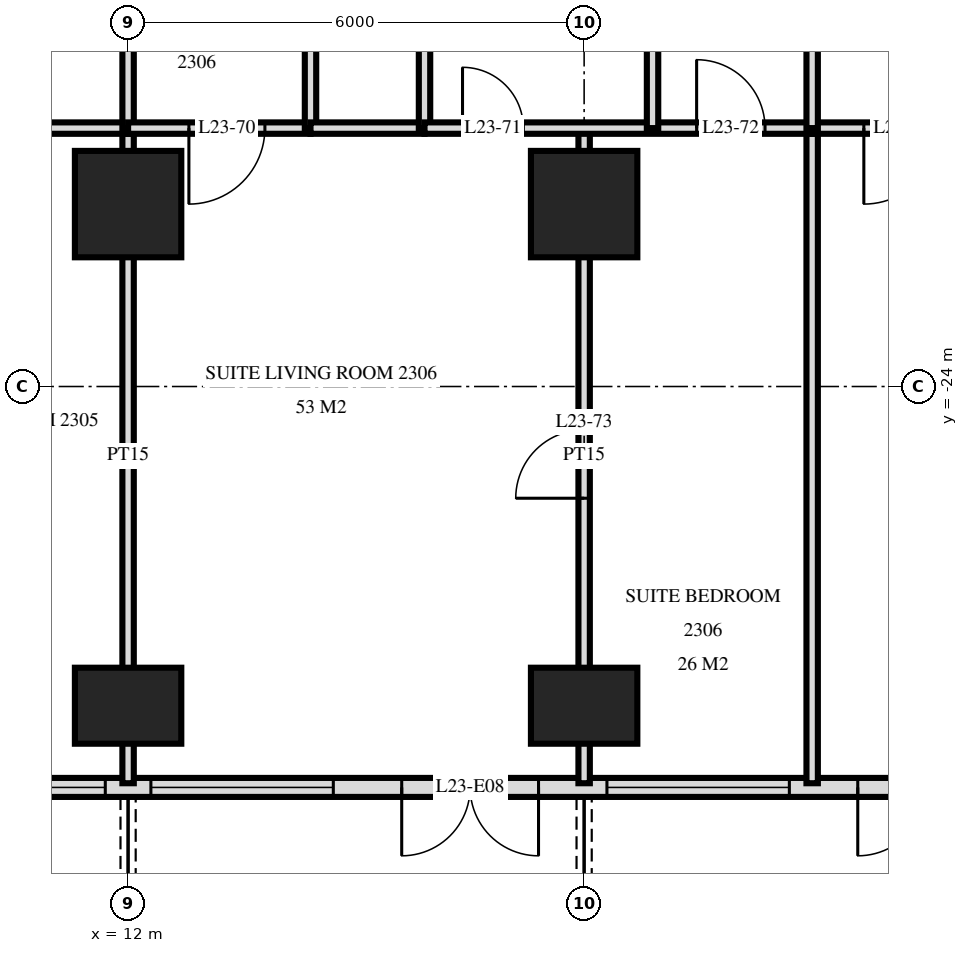
"""IFC4 building model, lengths in metres.
Left out: names, types, materials, properties, quantities, classifications, styles, units other than length and angle.
Written with IfcOpenShell. Run it as: python <this file> out.ifc"""

import sys

from ifc_helpers import new_model, si_unit, direction, frame, frame_2d, origin, origin_2d, place, context, subcontext, project, spatial, rectangle, extrude, element, fill, save


model = new_model("IFC4")
c1 = context("Model", 3, precision=1e-05, world=origin(), true_north=direction((0.0, 1.0)))
c2 = subcontext(c1, "Body", "Model", "MODEL_VIEW")
j1 = project(units=[si_unit("LENGTHUNIT", "METRE"), si_unit("PLANEANGLEUNIT", "RADIAN")], contexts=[c1])
p1 = place(None, origin())
s1 = spatial("IfcSite", under=j1, at=p1, CompositionType="ELEMENT")
p2 = place(p1, origin())
s2 = spatial("IfcBuilding", under=s1, at=p2, CompositionType="ELEMENT")
p3 = place(p2, frame((0.0, 0.0, 92.4)))
s3 = spatial("IfcBuildingStorey", under=s2, at=p3, CompositionType="ELEMENT", Elevation=92.4)
p4 = place(p3, frame((12.0, -28.2, 0.0), z_axis=(0.0, 0.0, 1.0), x_axis=(1.0, 0.0, 0.0)))
e1 = element("IfcColumn", 1, at=p4, inside=s3, PredefinedType="COLUMN", context=c2, shape_type="SweptSolid", body=[
    extrude(rectangle(XDim=1.4, YDim=1.0, at=origin_2d()), origin(), (0.0, 0.0, 1.0), 3.6),
])
p5 = place(p3, frame((12.0, -21.6, 0.0), z_axis=(0.0, 0.0, 1.0), x_axis=(1.0, 0.0, 0.0)))
e2 = element("IfcColumn", 2, at=p5, inside=s3, PredefinedType="COLUMN", context=c2, shape_type="SweptSolid", body=[
    extrude(rectangle(XDim=1.4, YDim=1.4, at=origin_2d()), origin(), (0.0, 0.0, 1.0), 3.6),
])
p6 = place(p3, frame((18.0, -28.2, 0.0), z_axis=(0.0, 0.0, 1.0), x_axis=(1.0, 0.0, 0.0)))
e3 = element("IfcColumn", 3, at=p6, inside=s3, PredefinedType="COLUMN", context=c2, shape_type="SweptSolid", body=[
    extrude(rectangle(XDim=1.4, YDim=1.0, at=origin_2d()), origin(), (0.0, 0.0, 1.0), 3.6),
])
p7 = place(p3, frame((18.0, -21.6, 0.0), z_axis=(0.0, 0.0, 1.0), x_axis=(1.0, 0.0, 0.0)))
e4 = element("IfcColumn", 4, at=p7, inside=s3, PredefinedType="COLUMN", context=c2, shape_type="SweptSolid", body=[
    extrude(rectangle(XDim=1.4, YDim=1.4, at=origin_2d()), origin(), (0.0, 0.0, 1.0), 3.6),
])
p8 = place(p3, frame((-28.775, -29.275, 0.0), z_axis=(0.0, 0.0, 1.0), x_axis=(1.0, 0.0, 0.0)))
e5 = element("IfcWall", 5, at=p8, inside=s3, PredefinedType="SOLIDWALL", context=c2, shape_type="SweptSolid", body=[
    extrude(rectangle(XDim=57.551, YDim=0.25, at=frame_2d((28.775, 0.0))), origin(), (0.0, 0.0, 1.0), 3.32),
])
p9 = place(p8, frame((0.575, 0.0, 0.0)))
e6 = element("IfcOpeningElement", 6, at=p9, cuts=e5, PredefinedType="OPENING", context=c2, shape_type="SweptSolid", body=[
    extrude(rectangle(XDim=1.8, YDim=2.4, at=frame_2d((0.9, 1.2))), frame((0.0, 0.135, 0.0), z_axis=(0.0, -1.0, 0.0), x_axis=(1.0, 0.0, 0.0)), (0.0, 0.0, 1.0), 0.27),
])
p10 = place(p8, frame((5.075, 0.0, 0.3)))
e7 = element("IfcOpeningElement", 7, at=p10, cuts=e5, PredefinedType="OPENING", context=c2, shape_type="SweptSolid", body=[
    extrude(rectangle(XDim=2.4, YDim=2.1, at=frame_2d((1.2, 1.05))), frame((0.0, 0.135, 0.0), z_axis=(0.0, -1.0, 0.0), x_axis=(1.0, 0.0, 0.0)), (0.0, 0.0, 1.0), 0.27),
])
p11 = place(p8, frame((8.375, 0.0, 0.0)))
e8 = element("IfcOpeningElement", 8, at=p11, cuts=e5, PredefinedType="OPENING", context=c2, shape_type="SweptSolid", body=[
    extrude(rectangle(XDim=1.8, YDim=2.4, at=frame_2d((0.9, 1.2))), frame((0.0, 0.135, 0.0), z_axis=(0.0, -1.0, 0.0), x_axis=(1.0, 0.0, 0.0)), (0.0, 0.0, 1.0), 0.27),
])
p12 = place(p8, frame((11.375, 0.0, 0.0)))
e9 = element("IfcOpeningElement", 9, at=p12, cuts=e5, PredefinedType="OPENING", context=c2, shape_type="SweptSolid", body=[
    extrude(rectangle(XDim=1.8, YDim=2.4, at=frame_2d((0.9, 1.2))), frame((0.0, 0.135, 0.0), z_axis=(0.0, -1.0, 0.0), x_axis=(1.0, 0.0, 0.0)), (0.0, 0.0, 1.0), 0.27),
])
p13 = place(p8, frame((14.075, 0.0, 0.3)))
e10 = element("IfcOpeningElement", 10, at=p13, cuts=e5, PredefinedType="OPENING", context=c2, shape_type="SweptSolid", body=[
    extrude(rectangle(XDim=2.4, YDim=2.1, at=frame_2d((1.2, 1.05))), frame((0.0, 0.135, 0.0), z_axis=(0.0, -1.0, 0.0), x_axis=(1.0, 0.0, 0.0)), (0.0, 0.0, 1.0), 0.27),
])
p14 = place(p8, frame((17.375, 0.0, 0.0)))
e11 = element("IfcOpeningElement", 11, at=p14, cuts=e5, PredefinedType="OPENING", context=c2, shape_type="SweptSolid", body=[
    extrude(rectangle(XDim=1.8, YDim=2.4, at=frame_2d((0.9, 1.2))), frame((0.0, 0.135, 0.0), z_axis=(0.0, -1.0, 0.0), x_axis=(1.0, 0.0, 0.0)), (0.0, 0.0, 1.0), 0.27),
])
p15 = place(p8, frame((20.075, 0.0, 0.3)))
e12 = element("IfcOpeningElement", 12, at=p15, cuts=e5, PredefinedType="OPENING", context=c2, shape_type="SweptSolid", body=[
    extrude(rectangle(XDim=2.4, YDim=2.1, at=frame_2d((1.2, 1.05))), frame((0.0, 0.135, 0.0), z_axis=(0.0, -1.0, 0.0), x_axis=(1.0, 0.0, 0.0)), (0.0, 0.0, 1.0), 0.27),
])
p16 = place(p8, frame((23.075, 0.0, 0.3)))
e13 = element("IfcOpeningElement", 13, at=p16, cuts=e5, PredefinedType="OPENING", context=c2, shape_type="SweptSolid", body=[
    extrude(rectangle(XDim=2.4, YDim=2.1, at=frame_2d((1.2, 1.05))), frame((0.0, 0.135, 0.0), z_axis=(0.0, -1.0, 0.0), x_axis=(1.0, 0.0, 0.0)), (0.0, 0.0, 1.0), 0.27),
])
p17 = place(p8, frame((26.375, 0.0, 0.0)))
e14 = element("IfcOpeningElement", 14, at=p17, cuts=e5, PredefinedType="OPENING", context=c2, shape_type="SweptSolid", body=[
    extrude(rectangle(XDim=1.8, YDim=2.4, at=frame_2d((0.9, 1.2))), frame((0.0, 0.135, 0.0), z_axis=(0.0, -1.0, 0.0), x_axis=(1.0, 0.0, 0.0)), (0.0, 0.0, 1.0), 0.27),
])
p18 = place(p8, frame((29.375, 0.0, 0.0)))
e15 = element("IfcOpeningElement", 15, at=p18, cuts=e5, PredefinedType="OPENING", context=c2, shape_type="SweptSolid", body=[
    extrude(rectangle(XDim=1.8, YDim=2.4, at=frame_2d((0.9, 1.2))), frame((0.0, 0.135, 0.0), z_axis=(0.0, -1.0, 0.0), x_axis=(1.0, 0.0, 0.0)), (0.0, 0.0, 1.0), 0.27),
])
p19 = place(p8, frame((32.075, 0.0, 0.3)))
e16 = element("IfcOpeningElement", 16, at=p19, cuts=e5, PredefinedType="OPENING", context=c2, shape_type="SweptSolid", body=[
    extrude(rectangle(XDim=2.4, YDim=2.1, at=frame_2d((1.2, 1.05))), frame((0.0, 0.135, 0.0), z_axis=(0.0, -1.0, 0.0), x_axis=(1.0, 0.0, 0.0)), (0.0, 0.0, 1.0), 0.27),
])
p20 = place(p8, frame((35.375, 0.0, 0.0)))
e17 = element("IfcOpeningElement", 17, at=p20, cuts=e5, PredefinedType="OPENING", context=c2, shape_type="SweptSolid", body=[
    extrude(rectangle(XDim=1.8, YDim=2.4, at=frame_2d((0.9, 1.2))), frame((0.0, 0.135, 0.0), z_axis=(0.0, -1.0, 0.0), x_axis=(1.0, 0.0, 0.0)), (0.0, 0.0, 1.0), 0.27),
])
p21 = place(p8, frame((38.075, 0.0, 0.3)))
e18 = element("IfcOpeningElement", 18, at=p21, cuts=e5, PredefinedType="OPENING", context=c2, shape_type="SweptSolid", body=[
    extrude(rectangle(XDim=2.4, YDim=2.1, at=frame_2d((1.2, 1.05))), frame((0.0, 0.135, 0.0), z_axis=(0.0, -1.0, 0.0), x_axis=(1.0, 0.0, 0.0)), (0.0, 0.0, 1.0), 0.27),
])
p22 = place(p8, frame((41.075, 0.0, 0.3)))
e19 = element("IfcOpeningElement", 19, at=p22, cuts=e5, PredefinedType="OPENING", context=c2, shape_type="SweptSolid", body=[
    extrude(rectangle(XDim=2.4, YDim=2.1, at=frame_2d((1.2, 1.05))), frame((0.0, 0.135, 0.0), z_axis=(0.0, -1.0, 0.0), x_axis=(1.0, 0.0, 0.0)), (0.0, 0.0, 1.0), 0.27),
])
p23 = place(p8, frame((44.375, 0.0, 0.0)))
e20 = element("IfcOpeningElement", 20, at=p23, cuts=e5, PredefinedType="OPENING", context=c2, shape_type="SweptSolid", body=[
    extrude(rectangle(XDim=1.8, YDim=2.4, at=frame_2d((0.9, 1.2))), frame((0.0, 0.135, 0.0), z_axis=(0.0, -1.0, 0.0), x_axis=(1.0, 0.0, 0.0)), (0.0, 0.0, 1.0), 0.27),
])
p24 = place(p8, frame((47.075, 0.0, 0.3)))
e21 = element("IfcOpeningElement", 21, at=p24, cuts=e5, PredefinedType="OPENING", context=c2, shape_type="SweptSolid", body=[
    extrude(rectangle(XDim=2.4, YDim=2.1, at=frame_2d((1.2, 1.05))), frame((0.0, 0.135, 0.0), z_axis=(0.0, -1.0, 0.0), x_axis=(1.0, 0.0, 0.0)), (0.0, 0.0, 1.0), 0.27),
])
p25 = place(p8, frame((50.375, 0.0, 0.0)))
e22 = element("IfcOpeningElement", 22, at=p25, cuts=e5, PredefinedType="OPENING", context=c2, shape_type="SweptSolid", body=[
    extrude(rectangle(XDim=1.8, YDim=2.4, at=frame_2d((0.9, 1.2))), frame((0.0, 0.135, 0.0), z_axis=(0.0, -1.0, 0.0), x_axis=(1.0, 0.0, 0.0)), (0.0, 0.0, 1.0), 0.27),
])
p26 = place(p8, frame((53.375, 0.0, 0.0)))
e23 = element("IfcOpeningElement", 23, at=p26, cuts=e5, PredefinedType="OPENING", context=c2, shape_type="SweptSolid", body=[
    extrude(rectangle(XDim=1.8, YDim=2.4, at=frame_2d((0.9, 1.2))), frame((0.0, 0.135, 0.0), z_axis=(0.0, -1.0, 0.0), x_axis=(1.0, 0.0, 0.0)), (0.0, 0.0, 1.0), 0.27),
])
p27 = place(p3, frame((21.0, -20.6, 0.0), z_axis=(0.0, 0.0, 1.0), x_axis=(0.0, 1.0, 0.0)))
e24 = element("IfcWall", 24, at=p27, inside=s3, PredefinedType="PARTITIONING", context=c2, shape_type="SweptSolid", body=[
    extrude(rectangle(XDim=3.6, YDim=0.15, at=frame_2d((1.8, 0.0))), origin(), (0.0, 0.0, 1.0), 3.32),
])
p28 = place(p3, frame((21.0, -29.22, 0.0), z_axis=(0.0, 0.0, 1.0), x_axis=(0.0, 1.0, 0.0)))
e25 = element("IfcWall", 25, at=p28, inside=s3, PredefinedType="PARTITIONING", context=c2, shape_type="SweptSolid", body=[
    extrude(rectangle(XDim=8.62, YDim=0.15, at=frame_2d((4.31, 0.0))), origin(), (0.0, 0.0, 1.0), 3.32),
])
p29 = place(p3, frame((18.9, -20.6, 0.0), z_axis=(0.0, 0.0, 1.0), x_axis=(0.0, 1.0, 0.0)))
e26 = element("IfcWall", 26, at=p29, inside=s3, PredefinedType="PARTITIONING", context=c2, shape_type="SweptSolid", body=[
    extrude(rectangle(XDim=3.6, YDim=0.15, at=frame_2d((1.8, 0.0))), origin(), (0.0, 0.0, 1.0), 3.32),
])
p30 = place(p3, frame((18.0, -29.22, 0.0), z_axis=(0.0, 0.0, 1.0), x_axis=(0.0, 1.0, 0.0)))
e27 = element("IfcWall", 27, at=p30, inside=s3, PredefinedType="PARTITIONING", context=c2, shape_type="SweptSolid", body=[
    extrude(rectangle(XDim=8.62, YDim=0.15, at=frame_2d((4.31, 0.0))), origin(), (0.0, 0.0, 1.0), 3.32),
])
p31 = place(p30, frame((3.75, 0.0, 0.0)))
e28 = element("IfcOpeningElement", 28, at=p31, cuts=e27, PredefinedType="OPENING", context=c2, shape_type="SweptSolid", body=[
    extrude(rectangle(XDim=0.9, YDim=2.1, at=frame_2d((0.45, 1.05))), frame((0.0, 0.085, 0.0), z_axis=(0.0, -1.0, 0.0), x_axis=(1.0, 0.0, 0.0)), (0.0, 0.0, 1.0), 0.17),
])
p32 = place(p3, frame((15.9, -20.6, 0.0), z_axis=(0.0, 0.0, 1.0), x_axis=(0.0, 1.0, 0.0)))
e29 = element("IfcWall", 29, at=p32, inside=s3, PredefinedType="PLUMBINGWALL", context=c2, shape_type="SweptSolid", body=[
    extrude(rectangle(XDim=3.6, YDim=0.15, at=frame_2d((1.8, 0.0))), origin(), (0.0, 0.0, 1.0), 3.32),
])
p33 = place(p3, frame((14.4, -20.6, 0.0), z_axis=(0.0, 0.0, 1.0), x_axis=(0.0, 1.0, 0.0)))
e30 = element("IfcWall", 30, at=p33, inside=s3, PredefinedType="PARTITIONING", context=c2, shape_type="SweptSolid", body=[
    extrude(rectangle(XDim=3.6, YDim=0.15, at=frame_2d((1.8, 0.0))), origin(), (0.0, 0.0, 1.0), 3.32),
])
p34 = place(p33, frame((1.3, 0.0, 0.0)))
e31 = element("IfcOpeningElement", 31, at=p34, cuts=e30, PredefinedType="OPENING", context=c2, shape_type="SweptSolid", body=[
    extrude(rectangle(XDim=1.0, YDim=2.1, at=frame_2d((0.5, 1.05))), frame((0.0, 0.085, 0.0), z_axis=(0.0, -1.0, 0.0), x_axis=(1.0, 0.0, 0.0)), (0.0, 0.0, 1.0), 0.17),
])
p35 = place(p3, frame((12.0, -20.6, 0.0), z_axis=(0.0, 0.0, 1.0), x_axis=(0.0, 1.0, 0.0)))
e32 = element("IfcWall", 32, at=p35, inside=s3, PredefinedType="PARTITIONING", context=c2, shape_type="SweptSolid", body=[
    extrude(rectangle(XDim=3.6, YDim=0.15, at=frame_2d((1.8, 0.0))), origin(), (0.0, 0.0, 1.0), 3.32),
])
p36 = place(p3, frame((12.0, -29.22, 0.0), z_axis=(0.0, 0.0, 1.0), x_axis=(0.0, 1.0, 0.0)))
e33 = element("IfcWall", 33, at=p36, inside=s3, PredefinedType="PARTITIONING", context=c2, shape_type="SweptSolid", body=[
    extrude(rectangle(XDim=8.62, YDim=0.15, at=frame_2d((4.31, 0.0))), origin(), (0.0, 0.0, 1.0), 3.32),
])
p37 = place(p3, frame((12.0, -20.6, 0.0), z_axis=(0.0, 0.0, 1.0), x_axis=(1.0, 0.0, 0.0)))
e34 = element("IfcWall", 34, at=p37, inside=s3, PredefinedType="PARTITIONING", context=c2, shape_type="SweptSolid", body=[
    extrude(rectangle(XDim=2.4, YDim=0.15, at=frame_2d((1.2, 0.0))), origin(), (0.0, 0.0, 1.0), 3.32),
])
p38 = place(p37, frame((0.8, 0.0, 0.0)))
e35 = element("IfcOpeningElement", 35, at=p38, cuts=e34, PredefinedType="OPENING", context=c2, shape_type="SweptSolid", body=[
    extrude(rectangle(XDim=1.0, YDim=2.1, at=frame_2d((0.5, 1.05))), frame((0.0, 0.085, 0.0), z_axis=(0.0, -1.0, 0.0), x_axis=(1.0, 0.0, 0.0)), (0.0, 0.0, 1.0), 0.17),
])
p39 = place(p3, frame((21.0, -20.6, 0.0), z_axis=(0.0, 0.0, 1.0), x_axis=(1.0, 0.0, 0.0)))
e36 = element("IfcWall", 36, at=p39, inside=s3, PredefinedType="PARTITIONING", context=c2, shape_type="SweptSolid", body=[
    extrude(rectangle(XDim=2.4, YDim=0.15, at=frame_2d((1.2, 0.0))), origin(), (0.0, 0.0, 1.0), 3.32),
])
p40 = place(p39, frame((0.68, 0.0, 0.0)))
e37 = element("IfcOpeningElement", 37, at=p40, cuts=e36, PredefinedType="OPENING", context=c2, shape_type="SweptSolid", body=[
    extrude(rectangle(XDim=1.0, YDim=2.1, at=frame_2d((0.5, 1.05))), frame((0.0, 0.085, 0.0), z_axis=(0.0, -1.0, 0.0), x_axis=(1.0, 0.0, 0.0)), (0.0, 0.0, 1.0), 0.17),
])
p41 = place(p3, frame((10.3, -20.6, 0.0), z_axis=(0.0, 0.0, 1.0), x_axis=(1.0, 0.0, 0.0)))
e38 = element("IfcWall", 38, at=p41, inside=s3, PredefinedType="PARTITIONING", context=c2, shape_type="SweptSolid", body=[
    extrude(rectangle(XDim=1.7, YDim=0.15, at=frame_2d((0.85, 0.0))), origin(), (0.0, 0.0, 1.0), 3.32),
])
p42 = place(p3, frame((15.9, -20.6, 0.0), z_axis=(0.0, 0.0, 1.0), x_axis=(1.0, 0.0, 0.0)))
e39 = element("IfcWall", 39, at=p42, inside=s3, PredefinedType="PARTITIONING", context=c2, shape_type="SweptSolid", body=[
    extrude(rectangle(XDim=5.1, YDim=0.15, at=frame_2d((2.55, 0.0))), origin(), (0.0, 0.0, 1.0), 3.32),
])
p43 = place(p42, frame((0.5, 0.0, 0.0)))
e40 = element("IfcOpeningElement", 40, at=p43, cuts=e39, PredefinedType="OPENING", context=c2, shape_type="SweptSolid", body=[
    extrude(rectangle(XDim=0.8, YDim=2.1, at=frame_2d((0.4, 1.05))), frame((0.0, 0.085, 0.0), z_axis=(0.0, -1.0, 0.0), x_axis=(1.0, 0.0, 0.0)), (0.0, 0.0, 1.0), 0.17),
])
p44 = place(p42, frame((3.58, 0.0, 0.0)))
e41 = element("IfcOpeningElement", 41, at=p44, cuts=e39, PredefinedType="OPENING", context=c2, shape_type="SweptSolid", body=[
    extrude(rectangle(XDim=0.9, YDim=2.1, at=frame_2d((0.45, 1.05))), frame((0.0, 0.085, 0.0), z_axis=(0.0, -1.0, 0.0), x_axis=(1.0, 0.0, 0.0)), (0.0, 0.0, 1.0), 0.17),
])
p45 = place(p3, frame((14.4, -20.6, 0.0), z_axis=(0.0, 0.0, 1.0), x_axis=(1.0, 0.0, 0.0)))
e42 = element("IfcWall", 42, at=p45, inside=s3, PredefinedType="PLUMBINGWALL", context=c2, shape_type="SweptSolid", body=[
    extrude(rectangle(XDim=1.5, YDim=0.15, at=frame_2d((0.75, 0.0))), origin(), (0.0, 0.0, 1.0), 3.32),
])
p46 = place(p21, origin())
e43 = element("IfcWindow", 43, at=p46, inside=s3, PartitioningType="SINGLE_PANEL", PredefinedType="WINDOW", context=c2, shape_type="SweptSolid", body=[
    extrude(rectangle(XDim=2.4, YDim=2.1, at=frame_2d((1.2, 1.05))), frame((0.0, 0.03, 0.0), z_axis=(0.0, -1.0, 0.0), x_axis=(1.0, 0.0, 0.0)), (0.0, 0.0, 1.0), 0.06),
])
fill(e18, e43)
p47 = place(p22, origin())
e44 = element("IfcWindow", 44, at=p47, inside=s3, PartitioningType="SINGLE_PANEL", PredefinedType="WINDOW", context=c2, shape_type="SweptSolid", body=[
    extrude(rectangle(XDim=2.4, YDim=2.1, at=frame_2d((1.2, 1.05))), frame((0.0, 0.03, 0.0), z_axis=(0.0, -1.0, 0.0), x_axis=(1.0, 0.0, 0.0)), (0.0, 0.0, 1.0), 0.06),
])
fill(e19, e44)
p48 = place(p23, frame((0.9, 0.0, 0.0), z_axis=(0.0, 0.0, 1.0), x_axis=(-1.0, 0.0, 0.0)))
e45 = element("IfcDoor", 45, at=p48, inside=s3, OperationType="DOUBLE_DOOR_SINGLE_SWING", PredefinedType="DOOR", context=c2, shape_type="SweptSolid", body=[
    extrude(rectangle(XDim=1.8, YDim=2.4, at=frame_2d((0.0, 1.2))), frame((0.0, -0.025, 0.0), z_axis=(0.0, 1.0, 0.0), x_axis=(-1.0, 0.0, 0.0)), (0.0, 0.0, 1.0), 0.05),
])
fill(e20, e45)
p49 = place(p24, origin())
e46 = element("IfcWindow", 46, at=p49, inside=s3, PartitioningType="SINGLE_PANEL", PredefinedType="WINDOW", context=c2, shape_type="SweptSolid", body=[
    extrude(rectangle(XDim=2.4, YDim=2.1, at=frame_2d((1.2, 1.05))), frame((0.0, 0.03, 0.0), z_axis=(0.0, -1.0, 0.0), x_axis=(1.0, 0.0, 0.0)), (0.0, 0.0, 1.0), 0.06),
])
fill(e21, e46)
p50 = place(p25, frame((0.9, 0.0, 0.0), z_axis=(0.0, 0.0, 1.0), x_axis=(-1.0, 0.0, 0.0)))
e47 = element("IfcDoor", 47, at=p50, inside=s3, OperationType="DOUBLE_DOOR_SINGLE_SWING", PredefinedType="DOOR", context=c2, shape_type="SweptSolid", body=[
    extrude(rectangle(XDim=1.8, YDim=2.4, at=frame_2d((0.0, 1.2))), frame((0.0, -0.025, 0.0), z_axis=(0.0, 1.0, 0.0), x_axis=(-1.0, 0.0, 0.0)), (0.0, 0.0, 1.0), 0.05),
])
fill(e22, e47)
p51 = place(p38, frame((0.5, 0.0, 0.0), z_axis=(0.0, 0.0, 1.0), x_axis=(-1.0, 0.0, 0.0)))
e48 = element("IfcDoor", 48, at=p51, inside=s3, OperationType="SINGLE_SWING_LEFT", PredefinedType="DOOR", context=c2, shape_type="SweptSolid", body=[
    extrude(rectangle(XDim=1.0, YDim=2.1, at=frame_2d((0.0, 1.05))), frame((0.0, -0.025, 0.0), z_axis=(0.0, 1.0, 0.0), x_axis=(-1.0, 0.0, 0.0)), (0.0, 0.0, 1.0), 0.05),
])
fill(e35, e48)
p52 = place(p43, origin())
e49 = element("IfcDoor", 49, at=p52, inside=s3, OperationType="SINGLE_SWING_RIGHT", PredefinedType="DOOR", context=c2, shape_type="SweptSolid", body=[
    extrude(rectangle(XDim=0.8, YDim=2.1, at=frame_2d((0.4, 1.05))), frame((0.0, 0.025, 0.0), z_axis=(0.0, -1.0, 0.0), x_axis=(1.0, 0.0, 0.0)), (0.0, 0.0, 1.0), 0.05),
])
fill(e40, e49)
p53 = place(p44, origin())
e50 = element("IfcDoor", 50, at=p53, inside=s3, OperationType="SINGLE_SWING_RIGHT", PredefinedType="DOOR", context=c2, shape_type="SweptSolid", body=[
    extrude(rectangle(XDim=0.9, YDim=2.1, at=frame_2d((0.45, 1.05))), frame((0.0, 0.025, 0.0), z_axis=(0.0, -1.0, 0.0), x_axis=(1.0, 0.0, 0.0)), (0.0, 0.0, 1.0), 0.05),
])
fill(e41, e50)
p54 = place(p31, origin())
e51 = element("IfcDoor", 51, at=p54, inside=s3, OperationType="SINGLE_SWING_RIGHT", PredefinedType="DOOR", context=c2, shape_type="SweptSolid", body=[
    extrude(rectangle(XDim=0.9, YDim=2.1, at=frame_2d((0.45, 1.05))), frame((0.0, 0.025, 0.0), z_axis=(0.0, -1.0, 0.0), x_axis=(1.0, 0.0, 0.0)), (0.0, 0.0, 1.0), 0.05),
])
fill(e28, e51)
p55 = place(p40, frame((0.5, 0.0, 0.0), z_axis=(0.0, 0.0, 1.0), x_axis=(-1.0, 0.0, 0.0)))
e52 = element("IfcDoor", 52, at=p55, inside=s3, OperationType="SINGLE_SWING_LEFT", PredefinedType="DOOR", context=c2, shape_type="SweptSolid", body=[
    extrude(rectangle(XDim=1.0, YDim=2.1, at=frame_2d((0.0, 1.05))), frame((0.0, -0.025, 0.0), z_axis=(0.0, 1.0, 0.0), x_axis=(-1.0, 0.0, 0.0)), (0.0, 0.0, 1.0), 0.05),
])
fill(e37, e52)
save(model, sys.argv[1])
